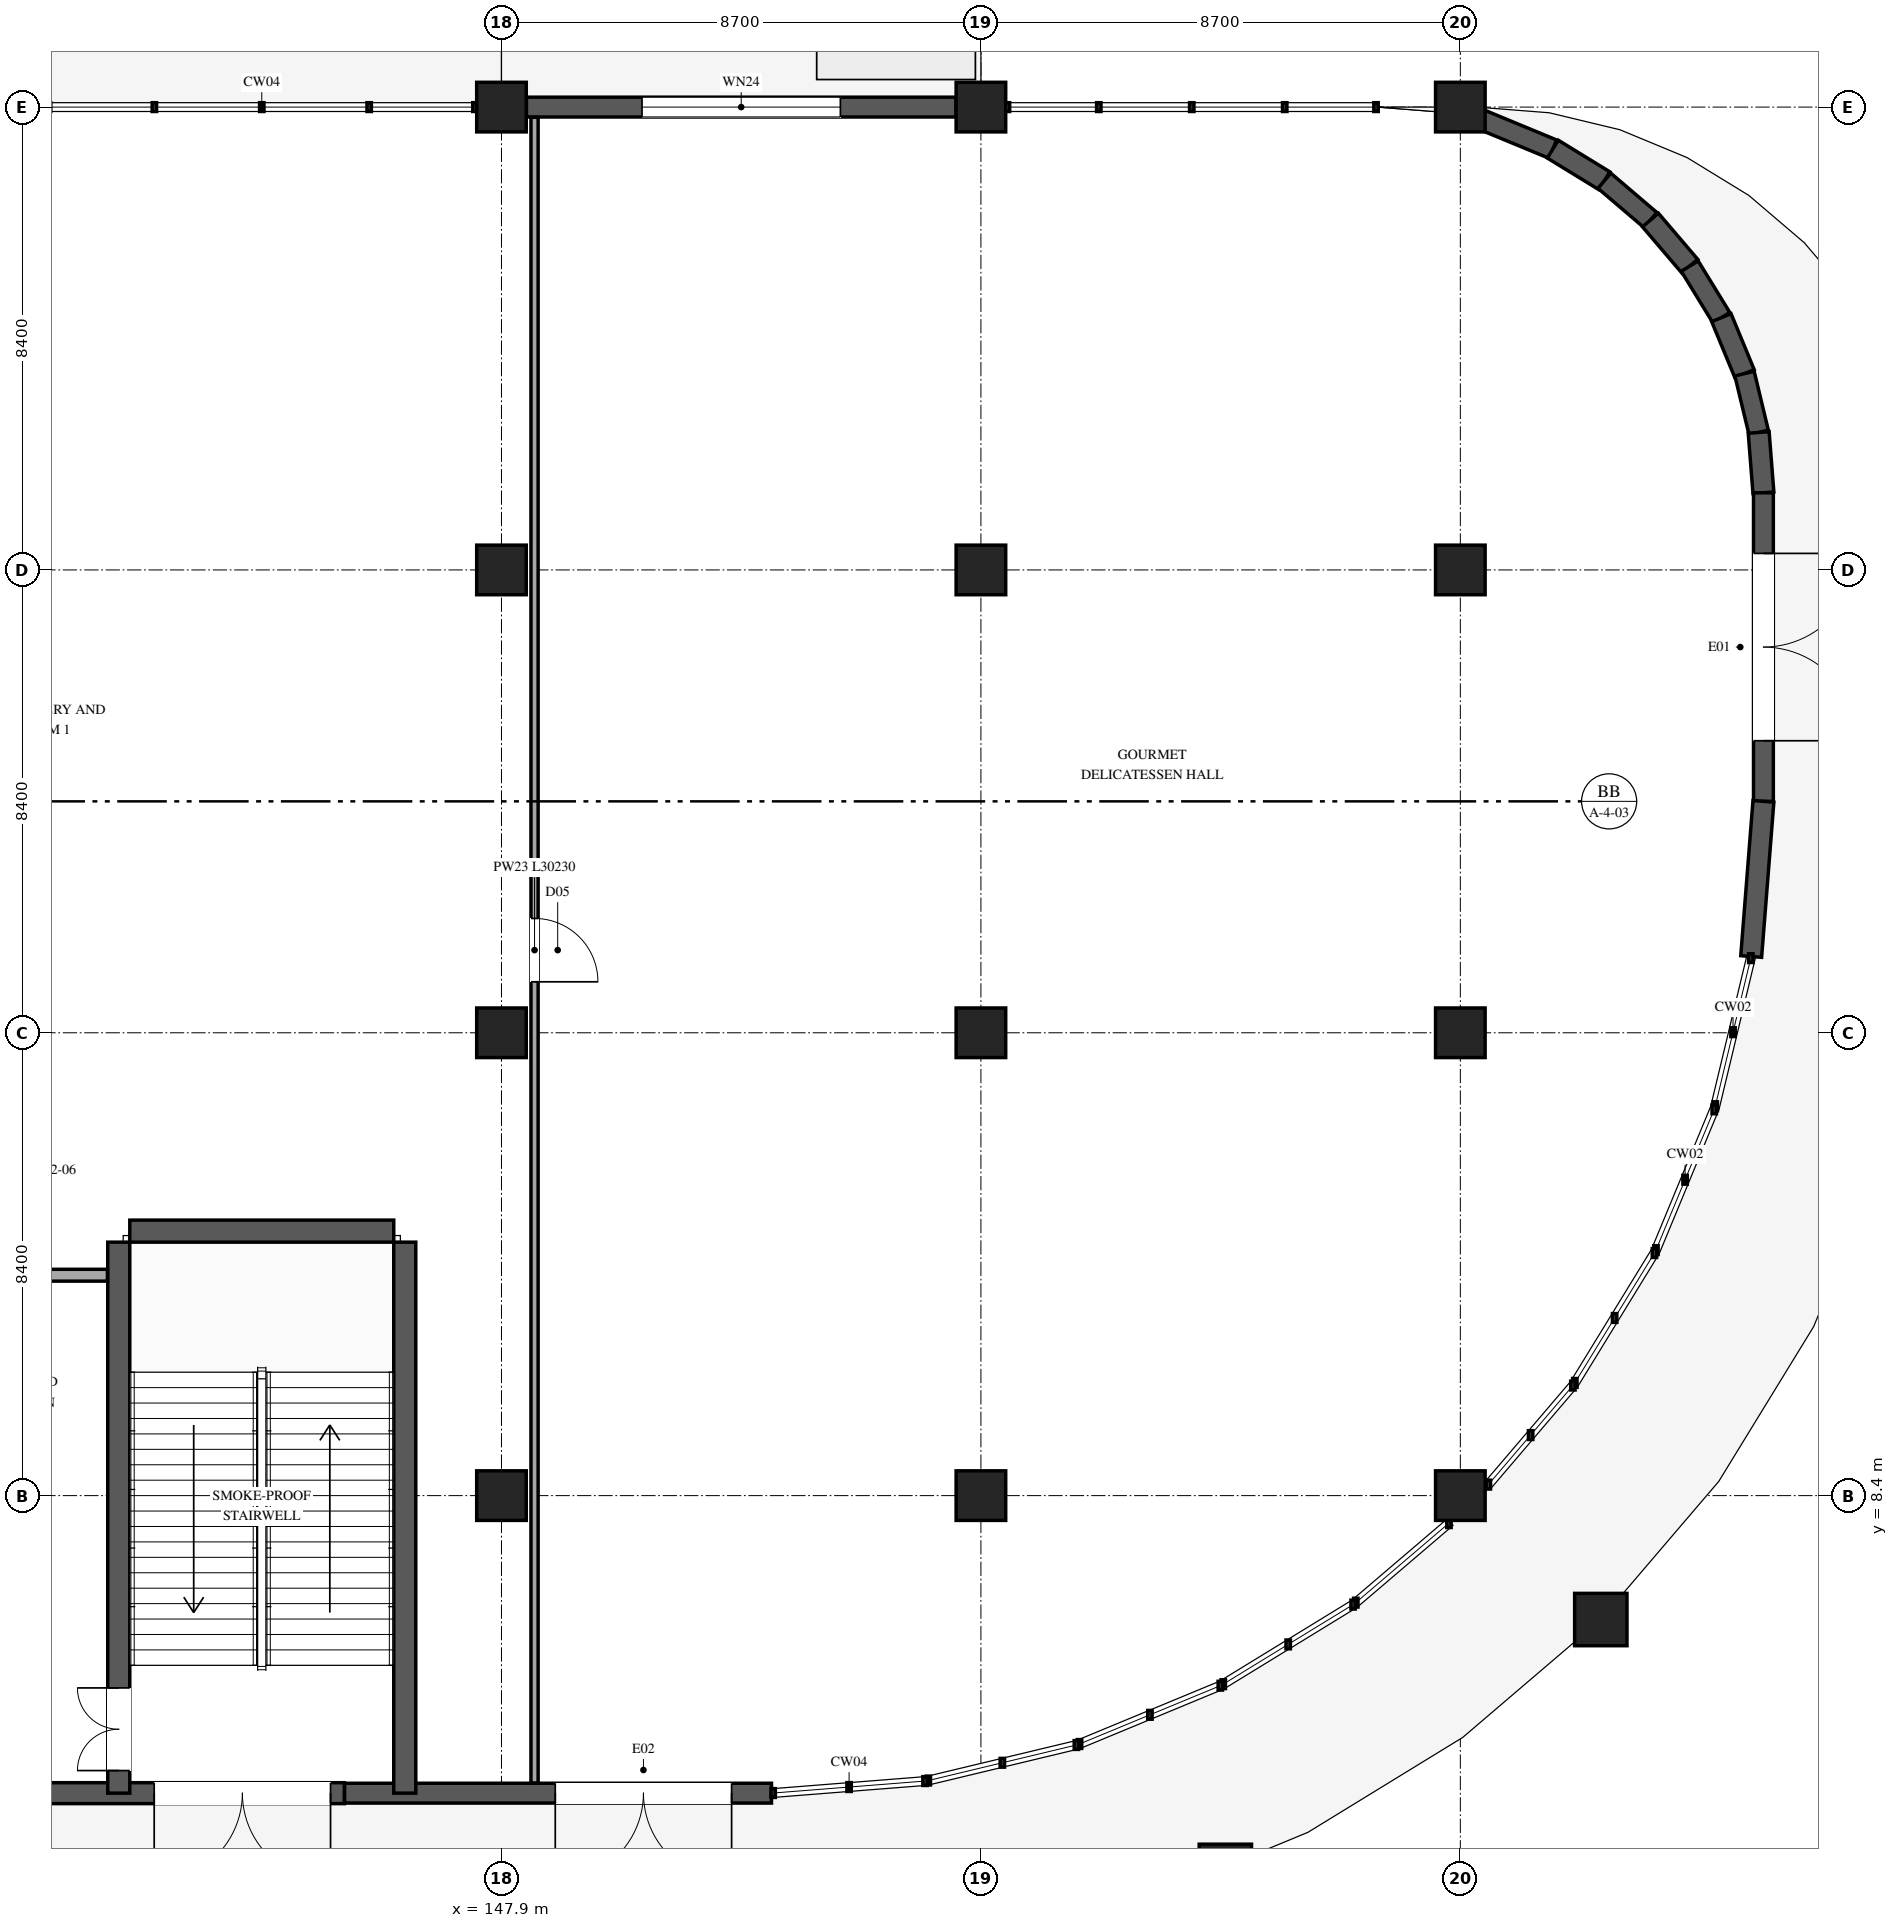
"""IFC4 building model, lengths in metres.
Left out: names, types, materials, properties, quantities, classifications, styles, units other than length and angle.
Written with IfcOpenShell. Run it as: python <this file> out.ifc"""

import sys

from ifc_helpers import new_model, si_unit, direction, frame, frame_2d, origin, origin_2d, place, context, subcontext, project, spatial, rectangle, circle, extrude, element, fill, save


model = new_model("IFC4")
c1 = context("Model", 3, precision=1e-05, world=origin(), true_north=direction((0.0, 1.0)))
c2 = subcontext(c1, "Body", "Model", "MODEL_VIEW")
j1 = project(units=[si_unit("LENGTHUNIT", "METRE"), si_unit("PLANEANGLEUNIT", "RADIAN")], contexts=[c1])
p1 = place(None, origin())
s1 = spatial("IfcSite", under=j1, at=p1, CompositionType="ELEMENT")
p2 = place(p1, origin())
s2 = spatial("IfcBuilding", under=s1, at=p2, CompositionType="ELEMENT")
p3 = place(p2, origin())
s3 = spatial("IfcBuildingStorey", under=s2, at=p3, CompositionType="ELEMENT", Elevation=0.0)
for number, where, z_axis, x_axis in (
    (1, (147.9, 8.4, 0.0), (0.0, 0.0, 1.0), (1.0, 0.0, 0.0)),
    (2, (147.9, 16.8, 0.0), (0.0, 0.0, 1.0), (1.0, 0.0, 0.0)),
    (3, (147.9, 25.2, 0.0), (0.0, 0.0, 1.0), (1.0, 0.0, 0.0)),
    (4, (147.9, 33.6, 0.0), (0.0, 0.0, 1.0), (1.0, 0.0, 0.0)),
    (5, (156.6, 8.4, 0.0), (0.0, 0.0, 1.0), (1.0, 0.0, 0.0)),
    (6, (156.6, 16.8, 0.0), (0.0, 0.0, 1.0), (1.0, 0.0, 0.0)),
    (7, (156.6, 25.2, 0.0), (0.0, 0.0, 1.0), (1.0, 0.0, 0.0)),
    (8, (156.6, 33.6, 0.0), (0.0, 0.0, 1.0), (1.0, 0.0, 0.0)),
    (9, (165.3, 8.4, 0.0), (0.0, 0.0, 1.0), (1.0, 0.0, 0.0)),
    (10, (165.3, 16.8, 0.0), (0.0, 0.0, 1.0), (1.0, 0.0, 0.0)),
    (11, (165.3, 25.2, 0.0), (0.0, 0.0, 1.0), (1.0, 0.0, 0.0)),
    (12, (165.3, 33.6, 0.0), (0.0, 0.0, 1.0), (1.0, 0.0, 0.0)),
):
    element("IfcColumn", number, at=place(p3, frame(where, z_axis=z_axis, x_axis=x_axis)), inside=s3, PredefinedType="COLUMN", context=c2, shape_type="SweptSolid", body=[
        extrude(rectangle(XDim=0.9, YDim=0.9, at=origin_2d()), origin(), (0.0, 0.0, 1.0), 6.0),
    ])
for number, where, z_axis, x_axis in (
    (13, (161.036, 1.599, 0.0), (0.0, 0.0, 1.0), (1.0, 0.0, 0.0)),
    (14, (167.849, 6.151, 0.0), (0.0, 0.0, 1.0), (1.0, 0.0, 0.0)),
):
    element("IfcColumn", number, at=place(p3, frame(where, z_axis=z_axis, x_axis=x_axis)), inside=s3, PredefinedType="PILASTER", context=c2, shape_type="SweptSolid", body=[
        extrude(circle(Radius=0.475, at=origin_2d()), origin(), (0.0, 0.0, 1.0), 6.0),
    ])
p4 = place(p3, frame((165.693, 33.369, 0.0), z_axis=(0.0, 0.0, 1.0), x_axis=(0.923941959099, -0.382532686467, 0.0)))
e15 = element("IfcWall", 15, at=p4, inside=s3, PredefinedType="STANDARD", context=c2, shape_type="SweptSolid", body=[
    extrude(rectangle(XDim=1.391, YDim=0.36, at=frame_2d((0.695, 0.0))), origin(), (0.0, 0.0, 1.0), 5.66),
])
p5 = place(p3, frame((166.978, 32.837, 0.0), z_axis=(0.0, 0.0, 1.0), x_axis=(0.85248938518, -0.522744534314, 0.0)))
e16 = element("IfcWall", 16, at=p5, inside=s3, PredefinedType="STANDARD", context=c2, shape_type="SweptSolid", body=[
    extrude(rectangle(XDim=1.098, YDim=0.38, at=frame_2d((0.549, 0.0))), origin(), (0.0, 0.0, 1.0), 5.66),
])
p6 = place(p3, frame((167.914, 32.263, 0.0), z_axis=(0.0, 0.0, 1.0), x_axis=(0.760885582332, -0.648886069044, 0.0)))
e17 = element("IfcWall", 17, at=p6, inside=s3, PredefinedType="STANDARD", context=c2, shape_type="SweptSolid", body=[
    extrude(rectangle(XDim=1.099, YDim=0.36, at=frame_2d((0.549, 0.0))), origin(), (0.0, 0.0, 1.0), 5.66),
])
p7 = place(p3, frame((168.75, 31.55, 0.0), z_axis=(0.0, 0.0, 1.0), x_axis=(0.648886069044, -0.760885582332, 0.0)))
e18 = element("IfcWall", 18, at=p7, inside=s3, PredefinedType="STANDARD", context=c2, shape_type="SweptSolid", body=[
    extrude(rectangle(XDim=1.099, YDim=0.38, at=frame_2d((0.549, 0.0))), origin(), (0.0, 0.0, 1.0), 5.66),
])
p8 = place(p3, frame((169.463, 30.714, 0.0), z_axis=(0.0, 0.0, 1.0), x_axis=(0.522906096273, -0.852390294689, 0.0)))
e19 = element("IfcWall", 19, at=p8, inside=s3, PredefinedType="STANDARD", context=c2, shape_type="SweptSolid", body=[
    extrude(rectangle(XDim=1.098, YDim=0.36, at=frame_2d((0.549, 0.0))), origin(), (0.0, 0.0, 1.0), 5.66),
])
p9 = place(p3, frame((170.037, 29.778, 0.0), z_axis=(0.0, 0.0, 1.0), x_axis=(0.382247102127, -0.924060145724, 0.0)))
e20 = element("IfcWall", 20, at=p9, inside=s3, PredefinedType="STANDARD", context=c2, shape_type="SweptSolid", body=[
    extrude(rectangle(XDim=1.099, YDim=0.38, at=frame_2d((0.549, 0.0))), origin(), (0.0, 0.0, 1.0), 5.66),
])
p10 = place(p3, frame((170.457, 28.763, 0.0), z_axis=(0.0, 0.0, 1.0), x_axis=(0.234053838575, -0.972223637158, 0.0)))
e21 = element("IfcWall", 21, at=p10, inside=s3, PredefinedType="STANDARD", context=c2, shape_type="SweptSolid", body=[
    extrude(rectangle(XDim=1.098, YDim=0.36, at=frame_2d((0.549, 0.0))), origin(), (0.0, 0.0, 1.0), 5.66),
])
p11 = place(p3, frame((170.714, 27.695, 0.0), z_axis=(0.0, 0.0, 1.0), x_axis=(0.078243227069, -0.996934299449, 0.0)))
e22 = element("IfcWall", 22, at=p11, inside=s3, PredefinedType="STANDARD", context=c2, shape_type="SweptSolid", body=[
    extrude(rectangle(XDim=1.098, YDim=0.38, at=frame_2d((0.549, 0.0))), origin(), (0.0, 0.0, 1.0), 5.66),
])
p12 = place(p3, frame((170.8, 26.6, 0.0), z_axis=(0.0, 0.0, 1.0), x_axis=(0.0, -1.0, 0.0)))
e23 = element("IfcWall", 23, at=p12, inside=s3, PredefinedType="STANDARD", context=c2, shape_type="SweptSolid", body=[
    extrude(rectangle(XDim=5.6, YDim=0.36, at=frame_2d((2.8, 0.0))), origin(), (0.0, 0.0, 1.0), 5.66),
])
p13 = place(p12, frame((1.1, 0.0, 0.0)))
e24 = element("IfcOpeningElement", 24, at=p13, cuts=e23, PredefinedType="OPENING", context=c2, shape_type="SweptSolid", body=[
    extrude(rectangle(XDim=3.4, YDim=2.8, at=frame_2d((1.7, 1.4))), frame((0.0, 0.19, 0.0), z_axis=(0.0, -1.0, 0.0), x_axis=(1.0, 0.0, 0.0)), (0.0, 0.0, 1.0), 0.38),
])
p14 = place(p3, frame((170.8, 21.0, 0.0), z_axis=(0.0, 0.0, 1.0), x_axis=(-0.078652755923, -0.996902073418, 0.0)))
e25 = element("IfcWall", 25, at=p14, inside=s3, PredefinedType="STANDARD", context=c2, shape_type="SweptSolid", body=[
    extrude(rectangle(XDim=2.825, YDim=0.38, at=frame_2d((1.412, 0.0))), origin(), (0.0, 0.0, 1.0), 5.66),
])
p15 = place(p3, frame((152.8, 3.0, 0.0), z_axis=(0.0, 0.0, 1.0), x_axis=(-1.0, 0.0, 0.0)))
e26 = element("IfcWall", 26, at=p15, inside=s3, PredefinedType="STANDARD", context=c2, shape_type="SweptSolid", body=[
    extrude(rectangle(XDim=7.748, YDim=0.36, at=frame_2d((3.874, 0.0))), origin(), (0.0, 0.0, 1.0), 5.66),
])
p16 = place(p15, frame((0.724, 0.0, 0.0)))
e27 = element("IfcOpeningElement", 27, at=p16, cuts=e26, PredefinedType="OPENING", context=c2, shape_type="SweptSolid", body=[
    extrude(rectangle(XDim=3.2, YDim=2.7, at=frame_2d((1.6, 1.35))), frame((0.0, 0.19, 0.0), z_axis=(0.0, -1.0, 0.0), x_axis=(1.0, 0.0, 0.0)), (0.0, 0.0, 1.0), 0.38),
])
p17 = place(p3, frame((145.048, 3.0, 0.0), z_axis=(0.0, 0.0, 1.0), x_axis=(-1.0, 0.0, 0.0)))
e28 = element("IfcWall", 28, at=p17, inside=s3, PredefinedType="STANDARD", context=c2, shape_type="SweptSolid", body=[
    extrude(rectangle(XDim=7.746, YDim=0.38, at=frame_2d((3.873, 0.0))), origin(), (0.0, 0.0, 1.0), 5.66),
])
p18 = place(p17, frame((0.25, 0.0, 0.0)))
e29 = element("IfcOpeningElement", 29, at=p18, cuts=e28, PredefinedType="OPENING", context=c2, shape_type="SweptSolid", body=[
    extrude(rectangle(XDim=3.2, YDim=2.4, at=frame_2d((1.6, 1.2))), frame((0.0, 0.2, 0.0), z_axis=(0.0, -1.0, 0.0), x_axis=(1.0, 0.0, 0.0)), (0.0, 0.0, 1.0), 0.4),
])
p19 = place(p3, frame((148.352, 33.6, 0.0), z_axis=(0.0, 0.0, 1.0), x_axis=(1.0, 0.0, 0.0)))
e30 = element("IfcWall", 30, at=p19, inside=s3, PredefinedType="STANDARD", context=c2, shape_type="SweptSolid", body=[
    extrude(rectangle(XDim=7.796, YDim=0.36, at=frame_2d((3.898, 0.0))), origin(), (0.0, 0.0, 1.0), 5.66),
])
p20 = place(p19, frame((2.098, 0.0, 0.85)))
e31 = element("IfcOpeningElement", 31, at=p20, cuts=e30, PredefinedType="OPENING", context=c2, shape_type="SweptSolid", body=[
    extrude(rectangle(XDim=3.6, YDim=2.65, at=frame_2d((1.8, 1.325))), frame((0.0, 0.19, 0.0), z_axis=(0.0, -1.0, 0.0), x_axis=(1.0, 0.0, 0.0)), (0.0, 0.0, 1.0), 0.38),
])
p21 = place(p3, frame((140.955, 3.0, 0.0), z_axis=(0.0, 0.0, 1.0), x_axis=(0.0, 1.0, 0.0)))
e32 = element("IfcWall", 32, at=p21, inside=s3, PredefinedType="SHEAR", context=c2, shape_type="SweptSolid", body=[
    extrude(rectangle(XDim=10.0, YDim=0.4, at=frame_2d((5.0, 0.0))), origin(), (0.0, 0.0, 1.0), 6.0),
])
p22 = place(p21, frame((0.41, 0.0, 0.0)))
e33 = element("IfcOpeningElement", 33, at=p22, cuts=e32, PredefinedType="OPENING", context=c2, shape_type="SweptSolid", body=[
    extrude(rectangle(XDim=1.5, YDim=2.2, at=frame_2d((0.75, 1.1))), frame((0.0, 0.21, 0.0), z_axis=(0.0, -1.0, 0.0), x_axis=(1.0, 0.0, 0.0)), (0.0, 0.0, 1.0), 0.42),
])
p23 = place(p3, frame((146.145, 13.0, 0.0), z_axis=(0.0, 0.0, 1.0), x_axis=(0.0, -1.0, 0.0)))
e34 = element("IfcWall", 34, at=p23, inside=s3, PredefinedType="SHEAR", context=c2, shape_type="SweptSolid", body=[
    extrude(rectangle(XDim=10.0, YDim=0.4, at=frame_2d((5.0, 0.0))), origin(), (0.0, 0.0, 1.0), 6.0),
])
p24 = place(p3, frame((141.155, 13.2, 0.0), z_axis=(0.0, 0.0, 1.0), x_axis=(1.0, 0.0, 0.0)))
e35 = element("IfcWall", 35, at=p24, inside=s3, PredefinedType="SHEAR", context=c2, shape_type="SweptSolid", body=[
    extrude(rectangle(XDim=4.79, YDim=0.4, at=frame_2d((2.395, 0.0))), origin(), (0.0, 0.0, 1.0), 6.0),
])
p25 = place(p3, frame((121.8, 12.4, 0.0), z_axis=(0.0, 0.0, 1.0), x_axis=(1.0, 0.0, 0.0)))
e36 = element("IfcWall", 36, at=p25, inside=s3, PredefinedType="PARTITIONING", context=c2, shape_type="SweptSolid", body=[
    extrude(rectangle(XDim=18.95, YDim=0.215, at=frame_2d((9.475, 0.0))), origin(), (0.0, 0.0, 1.0), 4.895),
])
p26 = place(p25, frame((8.8, 0.0, 0.0)))
e37 = element("IfcOpeningElement", 37, at=p26, cuts=e36, PredefinedType="OPENING", context=c2, shape_type="SweptSolid", body=[
    extrude(rectangle(XDim=1.35, YDim=2.2, at=frame_2d((0.675, 1.1))), frame((0.0, 0.118, 0.0), z_axis=(0.0, -1.0, 0.0), x_axis=(1.0, 0.0, 0.0)), (0.0, 0.0, 1.0), 0.235),
])
p27 = place(p3, frame((148.5, 33.415, 0.0), z_axis=(0.0, 0.0, 1.0), x_axis=(0.0, -1.0, 0.0)))
e38 = element("IfcWall", 38, at=p27, inside=s3, PredefinedType="PARTITIONING", context=c2, shape_type="SweptSolid", body=[
    extrude(rectangle(XDim=30.23, YDim=0.13, at=frame_2d((15.115, 0.0))), origin(), (0.0, 0.0, 1.0), 4.895),
])
p28 = place(p27, frame((14.54, 0.0, 0.0)))
e39 = element("IfcOpeningElement", 39, at=p28, cuts=e38, PredefinedType="OPENING", context=c2, shape_type="SweptSolid", body=[
    extrude(rectangle(XDim=1.15, YDim=2.25, at=frame_2d((0.575, 1.125))), frame((0.0, 0.075, 0.0), z_axis=(0.0, -1.0, 0.0), x_axis=(1.0, 0.0, 0.0)), (0.0, 0.0, 1.0), 0.15),
])
p29 = place(p13, origin())
e40 = element("IfcDoor", 40, at=p29, inside=s3, OperationType="DOUBLE_DOOR_SINGLE_SWING", PredefinedType="DOOR", context=c2, shape_type="SweptSolid", body=[
    extrude(rectangle(XDim=3.4, YDim=2.8, at=frame_2d((1.7, 1.4))), frame((0.0, 0.025, 0.0), z_axis=(0.0, -1.0, 0.0), x_axis=(1.0, 0.0, 0.0)), (0.0, 0.0, 1.0), 0.05),
])
fill(e24, e40)
p30 = place(p16, origin())
e41 = element("IfcDoor", 41, at=p30, inside=s3, OperationType="DOUBLE_DOOR_SINGLE_SWING", PredefinedType="DOOR", context=c2, shape_type="SweptSolid", body=[
    extrude(rectangle(XDim=3.2, YDim=2.7, at=frame_2d((1.6, 1.35))), frame((0.0, 0.025, 0.0), z_axis=(0.0, -1.0, 0.0), x_axis=(1.0, 0.0, 0.0)), (0.0, 0.0, 1.0), 0.05),
])
fill(e27, e41)
p31 = place(p18, origin())
e42 = element("IfcDoor", 42, at=p31, inside=s3, OperationType="DOUBLE_DOOR_SINGLE_SWING", PredefinedType="USERDEFINED", context=c2, shape_type="SweptSolid", body=[
    extrude(rectangle(XDim=3.2, YDim=2.4, at=frame_2d((1.6, 1.2))), frame((0.0, 0.025, 0.0), z_axis=(0.0, -1.0, 0.0), x_axis=(1.0, 0.0, 0.0)), (0.0, 0.0, 1.0), 0.05),
])
fill(e29, e42)
p32 = place(p20, origin())
e43 = element("IfcWindow", 43, at=p32, inside=s3, PartitioningType="TRIPLE_PANEL_VERTICAL", PredefinedType="WINDOW", context=c2, shape_type="SweptSolid", body=[
    extrude(rectangle(XDim=3.6, YDim=2.65, at=frame_2d((1.8, 1.325))), frame((0.0, 0.03, 0.0), z_axis=(0.0, -1.0, 0.0), x_axis=(1.0, 0.0, 0.0)), (0.0, 0.0, 1.0), 0.06),
])
fill(e31, e43)
p33 = place(p22, origin())
e44 = element("IfcDoor", 44, at=p33, inside=s3, OperationType="DOUBLE_DOOR_SINGLE_SWING", PredefinedType="DOOR", context=c2, shape_type="SweptSolid", body=[
    extrude(rectangle(XDim=1.5, YDim=2.2, at=frame_2d((0.75, 1.1))), frame((0.0, 0.025, 0.0), z_axis=(0.0, -1.0, 0.0), x_axis=(1.0, 0.0, 0.0)), (0.0, 0.0, 1.0), 0.05),
])
fill(e33, e44)
p34 = place(p28, origin())
e45 = element("IfcDoor", 45, at=p34, inside=s3, OperationType="SINGLE_SWING_RIGHT", PredefinedType="DOOR", context=c2, shape_type="SweptSolid", body=[
    extrude(rectangle(XDim=1.15, YDim=2.25, at=frame_2d((0.575, 1.125))), frame((0.0, 0.025, 0.0), z_axis=(0.0, -1.0, 0.0), x_axis=(1.0, 0.0, 0.0)), (0.0, 0.0, 1.0), 0.05),
])
fill(e39, e45)
save(model, sys.argv[1])
